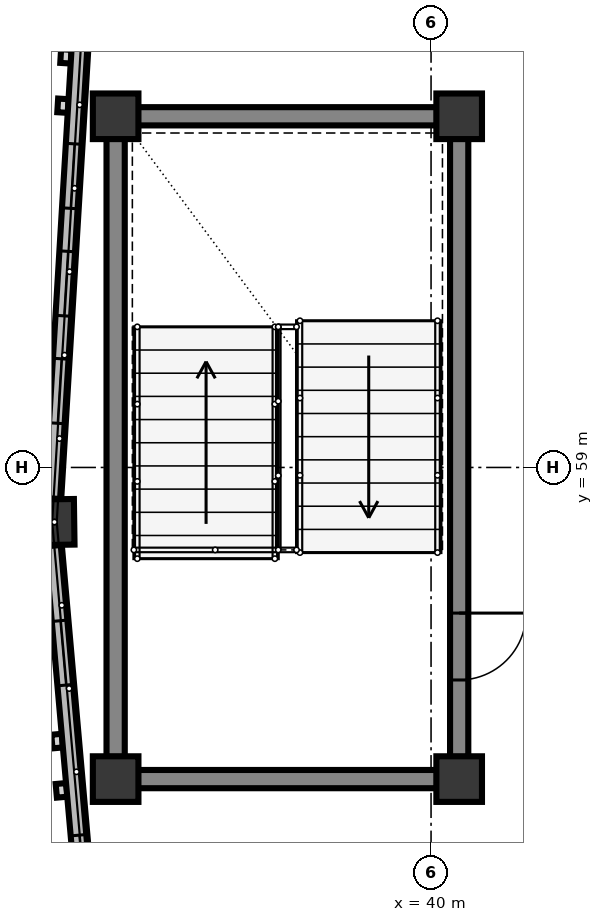
"""IFC4 building model, lengths in metres.
Left out: names, types, materials, properties, quantities, classifications, styles, units other than length and angle.
Written with IfcOpenShell. Run it as: python <this file> out.ifc"""

import sys

from ifc_helpers import new_model, si_unit, direction, frame, frame_2d, origin, origin_2d, place, context, subcontext, project, spatial, rectangle, extrude, element, fill, save


model = new_model("IFC4")
c1 = context("Model", 3, precision=1e-05, world=origin(), true_north=direction((0.0, 1.0)))
c2 = subcontext(c1, "Body", "Model", "MODEL_VIEW")
j1 = project(units=[si_unit("LENGTHUNIT", "METRE"), si_unit("PLANEANGLEUNIT", "RADIAN")], contexts=[c1])
p1 = place(None, origin())
s1 = spatial("IfcSite", under=j1, at=p1, CompositionType="ELEMENT")
p2 = place(p1, origin())
s2 = spatial("IfcBuilding", under=s1, at=p2, CompositionType="ELEMENT")
p3 = place(p2, frame((0.0, 0.0, 8.5)))
s3 = spatial("IfcBuildingStorey", under=s2, at=p3, CompositionType="ELEMENT", Elevation=8.5)
for number, where, z_axis, x_axis in (
    (1, (35.85, 54.9, 0.0), (0.0, 0.0, 1.0), (1.0, 0.0, 0.0)),
    (2, (40.37, 54.9, 0.0), (0.0, 0.0, 1.0), (1.0, 0.0, 0.0)),
    (3, (40.37, 63.62, 0.0), (0.0, 0.0, 1.0), (1.0, 0.0, 0.0)),
    (4, (35.85, 63.62, 0.0), (0.0, 0.0, 1.0), (1.0, 0.0, 0.0)),
    (5, (35.005, 58.281, 0.0), (0.0, 0.0, 1.0), (-1.0, -0.014, 0.0)),
):
    element("IfcColumn", number, at=place(p3, frame(where, z_axis=z_axis, x_axis=x_axis)), inside=s3, PredefinedType="COLUMN", context=c2, shape_type="SweptSolid", body=[
        extrude(rectangle(XDim=0.6, YDim=0.6, at=origin_2d()), origin(), (0.0, 0.0, 1.0), 4.0),
    ])
p4 = place(p3, frame((35.024, 58.591, 0.0), z_axis=(0.0, 0.0, 1.0), x_axis=(0.060150575124, 0.998189314866, 0.0)))
e6 = element("IfcWall", 6, at=p4, inside=s3, PredefinedType="SOLIDWALL", context=c2, shape_type="SweptSolid", body=[
    extrude(rectangle(XDim=7.083, YDim=0.22, at=frame_2d((3.542, 0.0))), origin(), (0.0, 0.0, 1.0), 3.192),
])
p5 = place(p4, frame((0.992, 0.0, 0.85)))
e7 = element("IfcOpeningElement", 7, at=p5, cuts=e6, PredefinedType="OPENING", context=c2, shape_type="SweptSolid", body=[
    extrude(rectangle(XDim=0.85, YDim=1.25, at=frame_2d((0.425, 0.625))), frame((0.0, 0.12, 0.0), z_axis=(0.0, -1.0, 0.0), x_axis=(1.0, 0.0, 0.0)), (0.0, 0.0, 1.0), 0.24),
])
p6 = place(p4, frame((2.408, 0.0, 0.85)))
e8 = element("IfcOpeningElement", 8, at=p6, cuts=e6, PredefinedType="OPENING", context=c2, shape_type="SweptSolid", body=[
    extrude(rectangle(XDim=0.85, YDim=1.25, at=frame_2d((0.425, 0.625))), frame((0.0, 0.12, 0.0), z_axis=(0.0, -1.0, 0.0), x_axis=(1.0, 0.0, 0.0)), (0.0, 0.0, 1.0), 0.24),
])
p7 = place(p4, frame((3.825, 0.0, 0.85)))
e9 = element("IfcOpeningElement", 9, at=p7, cuts=e6, PredefinedType="OPENING", context=c2, shape_type="SweptSolid", body=[
    extrude(rectangle(XDim=0.85, YDim=1.25, at=frame_2d((0.425, 0.625))), frame((0.0, 0.12, 0.0), z_axis=(0.0, -1.0, 0.0), x_axis=(1.0, 0.0, 0.0)), (0.0, 0.0, 1.0), 0.24),
])
p8 = place(p3, frame((35.655, 50.917, 0.0), z_axis=(0.0, 0.0, 1.0), x_axis=(-0.08798335938, 0.996121944579, 0.0)))
e10 = element("IfcWall", 10, at=p8, inside=s3, PredefinedType="SOLIDWALL", context=c2, shape_type="SweptSolid", body=[
    extrude(rectangle(XDim=7.081, YDim=0.22, at=frame_2d((3.541, 0.0))), origin(), (0.0, 0.0, 1.0), 3.192),
])
p9 = place(p8, frame((0.991, 0.0, 0.85)))
e11 = element("IfcOpeningElement", 11, at=p9, cuts=e10, PredefinedType="OPENING", context=c2, shape_type="SweptSolid", body=[
    extrude(rectangle(XDim=0.85, YDim=1.25, at=frame_2d((0.425, 0.625))), frame((0.0, 0.12, 0.0), z_axis=(0.0, -1.0, 0.0), x_axis=(1.0, 0.0, 0.0)), (0.0, 0.0, 1.0), 0.24),
])
p10 = place(p8, frame((2.408, 0.0, 0.85)))
e12 = element("IfcOpeningElement", 12, at=p10, cuts=e10, PredefinedType="OPENING", context=c2, shape_type="SweptSolid", body=[
    extrude(rectangle(XDim=0.85, YDim=1.25, at=frame_2d((0.425, 0.625))), frame((0.0, 0.12, 0.0), z_axis=(0.0, -1.0, 0.0), x_axis=(1.0, 0.0, 0.0)), (0.0, 0.0, 1.0), 0.24),
])
p11 = place(p8, frame((5.24, 0.0, 0.85)))
e13 = element("IfcOpeningElement", 13, at=p11, cuts=e10, PredefinedType="OPENING", context=c2, shape_type="SweptSolid", body=[
    extrude(rectangle(XDim=0.85, YDim=1.25, at=frame_2d((0.425, 0.625))), frame((0.0, 0.12, 0.0), z_axis=(0.0, -1.0, 0.0), x_axis=(1.0, 0.0, 0.0)), (0.0, 0.0, 1.0), 0.24),
])
p12 = place(p3, frame((35.85, 55.192, 0.0), z_axis=(0.0, 0.0, 1.0), x_axis=(0.0, 1.0, 0.0)))
e14 = element("IfcWall", 14, at=p12, inside=s3, PredefinedType="SHEAR", context=c2, shape_type="SweptSolid", body=[
    extrude(rectangle(XDim=8.136, YDim=0.24, at=frame_2d((4.068, 0.0))), origin(), (0.0, 0.0, 1.0), 3.74),
])
p13 = place(p3, frame((40.37, 63.328, 0.0), z_axis=(0.0, 0.0, 1.0), x_axis=(0.0, -1.0, 0.0)))
e15 = element("IfcWall", 15, at=p13, inside=s3, PredefinedType="SHEAR", context=c2, shape_type="SweptSolid", body=[
    extrude(rectangle(XDim=8.136, YDim=0.24, at=frame_2d((4.068, 0.0))), origin(), (0.0, 0.0, 1.0), 3.74),
])
p14 = place(p13, frame((6.244, 0.0, 0.0)))
e16 = element("IfcOpeningElement", 16, at=p14, cuts=e15, PredefinedType="OPENING", context=c2, shape_type="SweptSolid", body=[
    extrude(rectangle(XDim=0.88, YDim=2.1, at=frame_2d((0.44, 1.05))), frame((0.0, 0.13, 0.0), z_axis=(0.0, -1.0, 0.0), x_axis=(1.0, 0.0, 0.0)), (0.0, 0.0, 1.0), 0.26),
])
for number, where, z_axis, x_axis in (
    (17, (40.078, 54.9, 0.0), (0.0, 0.0, 1.0), (-1.0, 0.0, 0.0)),
    (18, (40.078, 63.62, 0.0), (0.0, 0.0, 1.0), (-1.0, 0.0, 0.0)),
):
    element("IfcWall", number, at=place(p3, frame(where, z_axis=z_axis, x_axis=x_axis)), inside=s3, PredefinedType="SHEAR", context=c2, shape_type="SweptSolid", body=[
        extrude(rectangle(XDim=3.936, YDim=0.24, at=frame_2d((1.968, 0.0))), origin(), (0.0, 0.0, 1.0), 3.74),
    ])
p15 = place(p5, origin())
e19 = element("IfcWindow", 19, at=p15, inside=s3, PartitioningType="SINGLE_PANEL", PredefinedType="WINDOW", context=c2, shape_type="SweptSolid", body=[
    extrude(rectangle(XDim=0.85, YDim=1.25, at=frame_2d((0.425, 0.625))), frame((0.0, 0.03, 0.0), z_axis=(0.0, -1.0, 0.0), x_axis=(1.0, 0.0, 0.0)), (0.0, 0.0, 1.0), 0.06),
])
fill(e7, e19)
p16 = place(p6, origin())
e20 = element("IfcWindow", 20, at=p16, inside=s3, PartitioningType="SINGLE_PANEL", PredefinedType="WINDOW", context=c2, shape_type="SweptSolid", body=[
    extrude(rectangle(XDim=0.85, YDim=1.25, at=frame_2d((0.425, 0.625))), frame((0.0, 0.03, 0.0), z_axis=(0.0, -1.0, 0.0), x_axis=(1.0, 0.0, 0.0)), (0.0, 0.0, 1.0), 0.06),
])
fill(e8, e20)
p17 = place(p7, origin())
e21 = element("IfcWindow", 21, at=p17, inside=s3, PartitioningType="SINGLE_PANEL", PredefinedType="WINDOW", context=c2, shape_type="SweptSolid", body=[
    extrude(rectangle(XDim=0.85, YDim=1.25, at=frame_2d((0.425, 0.625))), frame((0.0, 0.03, 0.0), z_axis=(0.0, -1.0, 0.0), x_axis=(1.0, 0.0, 0.0)), (0.0, 0.0, 1.0), 0.06),
])
fill(e9, e21)
p18 = place(p10, origin())
e22 = element("IfcWindow", 22, at=p18, inside=s3, PartitioningType="SINGLE_PANEL", PredefinedType="WINDOW", context=c2, shape_type="SweptSolid", body=[
    extrude(rectangle(XDim=0.85, YDim=1.25, at=frame_2d((0.425, 0.625))), frame((0.0, 0.03, 0.0), z_axis=(0.0, -1.0, 0.0), x_axis=(1.0, 0.0, 0.0)), (0.0, 0.0, 1.0), 0.06),
])
fill(e12, e22)
p19 = place(p11, origin())
e23 = element("IfcWindow", 23, at=p19, inside=s3, PartitioningType="SINGLE_PANEL", PredefinedType="WINDOW", context=c2, shape_type="SweptSolid", body=[
    extrude(rectangle(XDim=0.85, YDim=1.25, at=frame_2d((0.425, 0.625))), frame((0.0, 0.03, 0.0), z_axis=(0.0, -1.0, 0.0), x_axis=(1.0, 0.0, 0.0)), (0.0, 0.0, 1.0), 0.06),
])
fill(e13, e23)
p20 = place(p14, origin())
e24 = element("IfcDoor", 24, at=p20, inside=s3, OperationType="SINGLE_SWING_LEFT", PredefinedType="DOOR", context=c2, shape_type="SweptSolid", body=[
    extrude(rectangle(XDim=0.88, YDim=2.1, at=frame_2d((0.44, 1.05))), frame((0.0, 0.025, 0.0), z_axis=(0.0, -1.0, 0.0), x_axis=(1.0, 0.0, 0.0)), (0.0, 0.0, 1.0), 0.05),
])
fill(e16, e24)
save(model, sys.argv[1])
